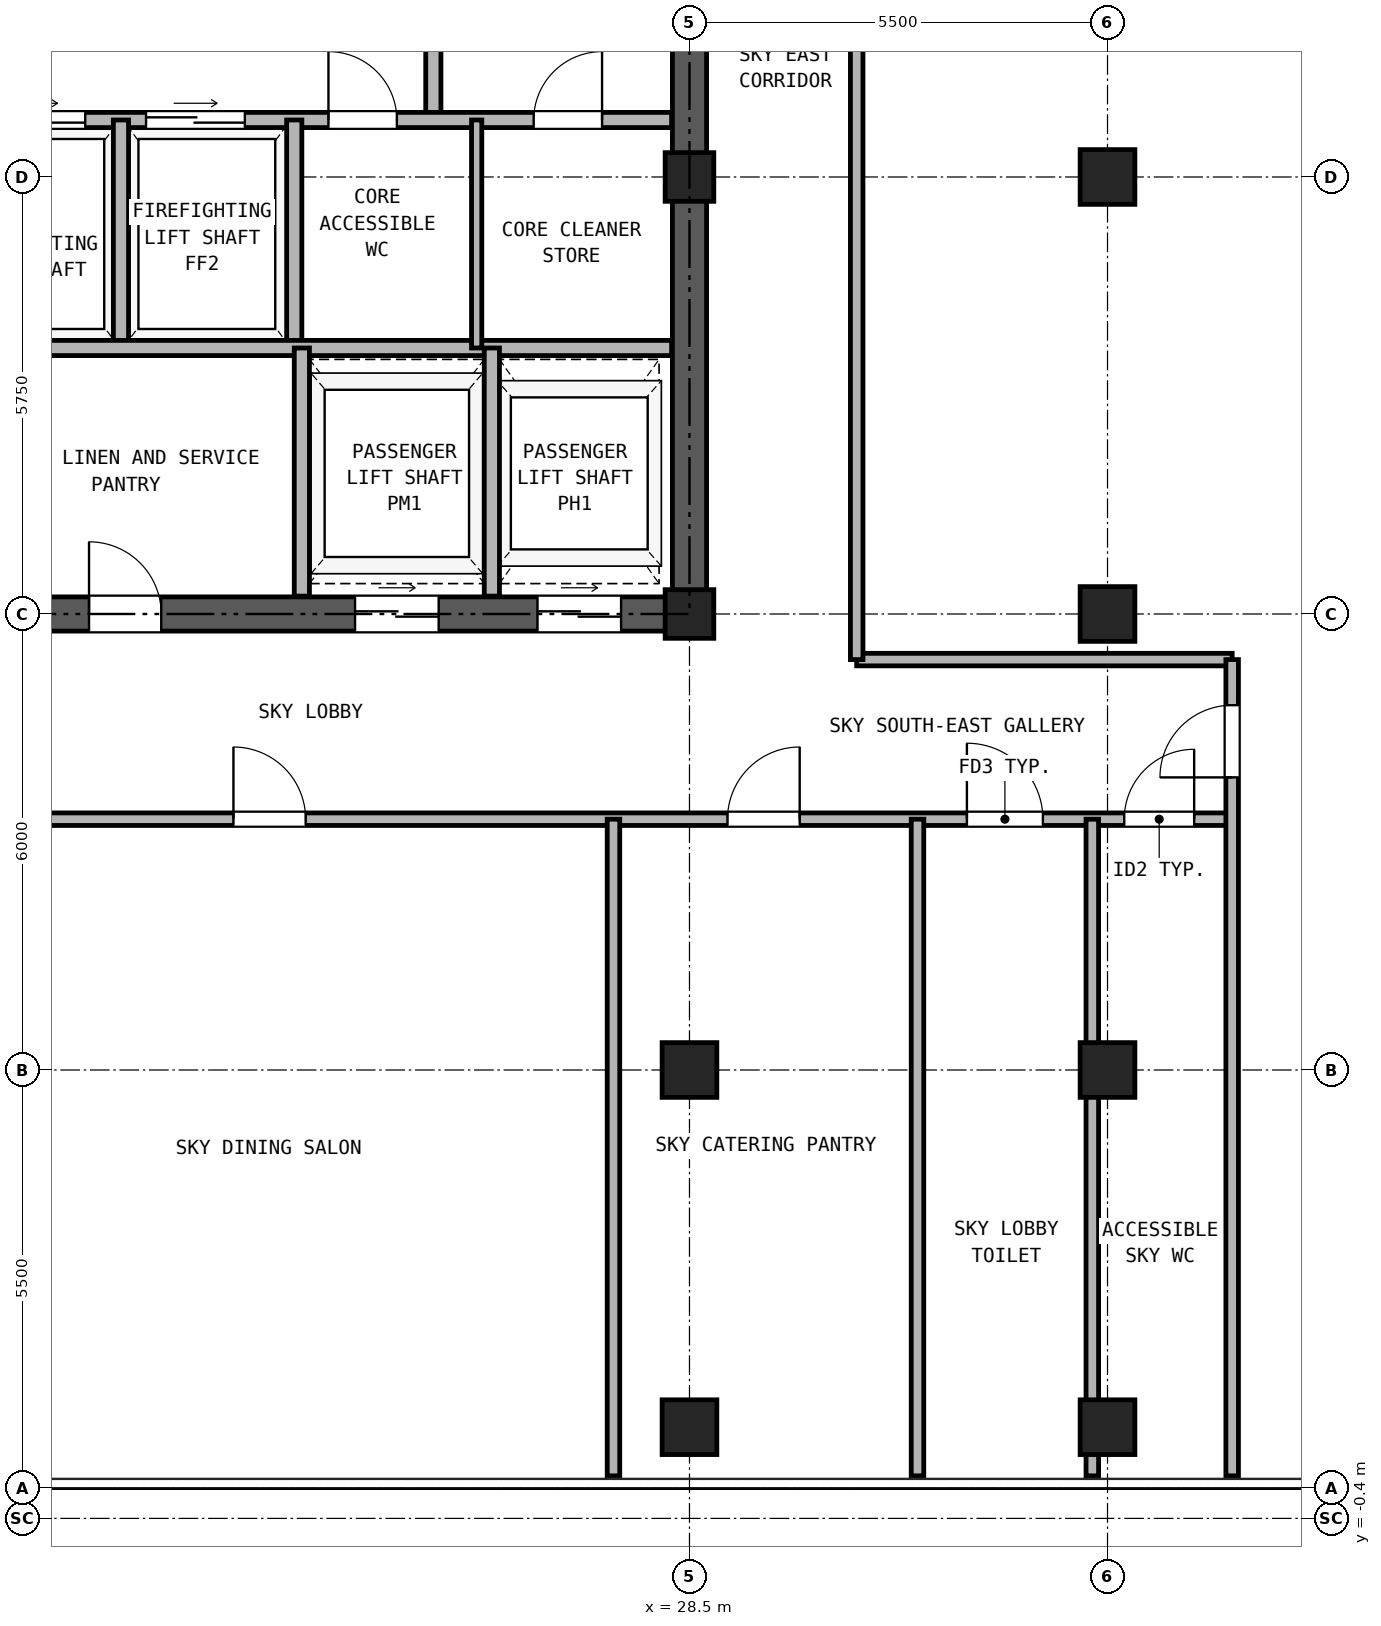
"""IFC4 building model, lengths in metres.
Left out: names, types, materials, properties, quantities, classifications, styles, units other than length and angle.
Written with IfcOpenShell. Run it as: python <this file> out.ifc"""

import sys

from ifc_helpers import new_model, si_unit, direction, frame, frame_2d, origin, origin_2d, place, context, subcontext, project, spatial, rectangle, hollow_rectangle, extrude, source, transform, mapped, element, fill, save


model = new_model("IFC4")
c1 = context("Model", 3, precision=1e-05, world=origin(), true_north=direction((0.0, 1.0)))
c2 = subcontext(c1, "Body", "Model", "MODEL_VIEW")
j1 = project(units=[si_unit("LENGTHUNIT", "METRE"), si_unit("PLANEANGLEUNIT", "RADIAN")], contexts=[c1])
p1 = place(None, origin())
s1 = spatial("IfcSite", under=j1, at=p1, CompositionType="ELEMENT")
p2 = place(p1, origin())
s2 = spatial("IfcBuilding", under=s1, at=p2, CompositionType="ELEMENT")
p3 = place(p2, frame((0.0, 0.0, 151.6)))
s3 = spatial("IfcBuildingStorey", under=s2, at=p3, CompositionType="ELEMENT", Elevation=151.6)
m1 = source(origin(), c2, "Body", "SweptSolid", [
    extrude(hollow_rectangle(XDim=0.72, YDim=0.72, WallThickness=0.04, at=origin_2d()), origin(), (0.0, 0.0, 1.0), 4.25),
])
for number, where, z_axis, x_axis in (
    (1, (28.5, 0.8, 0.0), (0.0, 0.0, 1.0), (1.0, 0.0, 0.0)),
    (2, (34.0, 0.8, 0.0), (0.0, 0.0, 1.0), (1.0, 0.0, 0.0)),
    (3, (28.5, 5.5, 0.0), (0.0, 0.0, 1.0), (1.0, 0.0, 0.0)),
):
    element("IfcColumn", number, at=place(p3, frame(where, z_axis=z_axis, x_axis=x_axis)), inside=s3, PredefinedType="COLUMN", context=c2, shape_type="MappedRepresentation", body=[
        mapped(m1, transform((0.0, 0.0, 0.0), x_axis=(1.0, 0.0, 0.0), y_axis=(0.0, 1.0, 0.0), z_axis=(0.0, 0.0, 1.0), scale=1.0)),
    ])
m2 = source(origin(), c2, "Body", "SweptSolid", [
    extrude(hollow_rectangle(XDim=0.64, YDim=0.64, WallThickness=0.035, at=origin_2d()), origin(), (0.0, 0.0, 1.0), 4.25),
])
for number, where, z_axis, x_axis in (
    (4, (28.5, 11.5, 0.0), (0.0, 0.0, 1.0), (1.0, 0.0, 0.0)),
    (5, (28.5, 17.25, 0.0), (0.0, 0.0, 1.0), (1.0, 0.0, 0.0)),
):
    element("IfcColumn", number, at=place(p3, frame(where, z_axis=z_axis, x_axis=x_axis)), inside=s3, PredefinedType="COLUMN", context=c2, shape_type="MappedRepresentation", body=[
        mapped(m2, transform((0.0, 0.0, 0.0), x_axis=(1.0, 0.0, 0.0), y_axis=(0.0, 1.0, 0.0), z_axis=(0.0, 0.0, 1.0), scale=1.0)),
    ])
for number, where, z_axis, x_axis in (
    (6, (34.0, 5.5, 0.0), (0.0, 0.0, 1.0), (1.0, 0.0, 0.0)),
    (7, (34.0, 11.5, 0.0), (0.0, 0.0, 1.0), (1.0, 0.0, 0.0)),
    (8, (34.0, 17.25, 0.0), (0.0, 0.0, 1.0), (1.0, 0.0, 0.0)),
):
    element("IfcColumn", number, at=place(p3, frame(where, z_axis=z_axis, x_axis=x_axis)), inside=s3, PredefinedType="COLUMN", context=c2, shape_type="MappedRepresentation", body=[
        mapped(m1, transform((0.0, 0.0, 0.0), x_axis=(1.0, 0.0, 0.0), y_axis=(0.0, 1.0, 0.0), z_axis=(0.0, 0.0, 1.0), scale=1.0)),
    ])
p4 = place(p3, frame((18.275, 11.5, 0.0), z_axis=(0.0, 0.0, 1.0), x_axis=(1.0, 0.0, 0.0)))
e9 = element("IfcWall", 9, at=p4, inside=s3, PredefinedType="SHEAR", context=c2, shape_type="SweptSolid", body=[
    extrude(rectangle(XDim=10.45, YDim=0.45, at=frame_2d((5.225, 0.0))), origin(), (0.0, 0.0, 1.0), 4.25),
])
p5 = place(p4, frame((2.325, 0.0, 0.0)))
e10 = element("IfcOpeningElement", 10, at=p5, cuts=e9, PredefinedType="OPENING", context=c2, shape_type="SweptSolid", body=[
    extrude(rectangle(XDim=0.95, YDim=2.15, at=frame_2d((0.475, 1.075))), frame((0.0, 0.235, 0.0), z_axis=(0.0, -1.0, 0.0), x_axis=(1.0, 0.0, 0.0)), (0.0, 0.0, 1.0), 0.47),
])
p6 = place(p4, frame((5.825, 0.0, 0.0)))
e11 = element("IfcOpeningElement", 11, at=p6, cuts=e9, PredefinedType="OPENING", context=c2, shape_type="SweptSolid", body=[
    extrude(rectangle(XDim=1.1, YDim=2.25, at=frame_2d((0.55, 1.125))), frame((0.0, 0.235, 0.0), z_axis=(0.0, -1.0, 0.0), x_axis=(1.0, 0.0, 0.0)), (0.0, 0.0, 1.0), 0.47),
])
p7 = place(p4, frame((8.225, 0.0, 0.0)))
e12 = element("IfcOpeningElement", 12, at=p7, cuts=e9, PredefinedType="OPENING", context=c2, shape_type="SweptSolid", body=[
    extrude(rectangle(XDim=1.1, YDim=2.25, at=frame_2d((0.55, 1.125))), frame((0.0, 0.235, 0.0), z_axis=(0.0, -1.0, 0.0), x_axis=(1.0, 0.0, 0.0)), (0.0, 0.0, 1.0), 0.47),
])
p8 = place(p3, frame((28.5, 11.725, 0.0), z_axis=(0.0, 0.0, 1.0), x_axis=(0.0, 1.0, 0.0)))
e13 = element("IfcWall", 13, at=p8, inside=s3, PredefinedType="SHEAR", context=c2, shape_type="SweptSolid", body=[
    extrude(rectangle(XDim=16.8, YDim=0.45, at=frame_2d((8.4, 0.0))), origin(), (0.0, 0.0, 1.0), 4.25),
])
p9 = place(p8, frame((7.425, 0.0, 0.0)))
e14 = element("IfcOpeningElement", 14, at=p9, cuts=e13, PredefinedType="OPENING", context=c2, shape_type="SweptSolid", body=[
    extrude(rectangle(XDim=1.15, YDim=2.2, at=frame_2d((0.575, 1.1))), frame((0.0, 0.235, 0.0), z_axis=(0.0, -1.0, 0.0), x_axis=(1.0, 0.0, 0.0)), (0.0, 0.0, 1.0), 0.47),
])
p10 = place(p3, frame((25.13, 18.0, 0.0), z_axis=(0.0, 0.0, 1.0), x_axis=(0.0, 1.0, 0.0)))
e15 = element("IfcWall", 15, at=p10, inside=s3, PredefinedType="PARTITIONING", context=c2, shape_type="SweptSolid", body=[
    extrude(rectangle(XDim=3.39, YDim=0.2, at=frame_2d((1.695, 0.0))), origin(), (0.0, 0.0, 1.0), 4.25),
])
p11 = place(p10, frame((1.1, 0.0, 0.0)))
e16 = element("IfcOpeningElement", 16, at=p11, cuts=e15, PredefinedType="OPENING", context=c2, shape_type="SweptSolid", body=[
    extrude(rectangle(XDim=1.15, YDim=2.2, at=frame_2d((0.575, 1.1))), frame((0.0, 0.11, 0.0), z_axis=(0.0, -1.0, 0.0), x_axis=(1.0, 0.0, 0.0)), (0.0, 0.0, 1.0), 0.22),
])
p12 = place(p3, frame((18.735, 18.0, 0.0), z_axis=(0.0, 0.0, 1.0), x_axis=(1.0, 0.0, 0.0)))
e17 = element("IfcWall", 17, at=p12, inside=s3, PredefinedType="PARTITIONING", context=c2, shape_type="SweptSolid", body=[
    extrude(rectangle(XDim=9.53, YDim=0.2, at=frame_2d((4.765, 0.0))), origin(), (0.0, 0.0, 1.0), 4.25),
])
p13 = place(p12, frame((0.515, 0.0, 0.0)))
e18 = element("IfcOpeningElement", 18, at=p13, cuts=e17, PredefinedType="OPENING", context=c2, shape_type="SweptSolid", body=[
    extrude(rectangle(XDim=1.3, YDim=2.3, at=frame_2d((0.65, 1.15))), frame((0.0, 0.11, 0.0), z_axis=(0.0, -1.0, 0.0), x_axis=(1.0, 0.0, 0.0)), (0.0, 0.0, 1.0), 0.22),
])
p14 = place(p12, frame((2.615, 0.0, 0.0)))
e19 = element("IfcOpeningElement", 19, at=p14, cuts=e17, PredefinedType="OPENING", context=c2, shape_type="SweptSolid", body=[
    extrude(rectangle(XDim=1.3, YDim=2.3, at=frame_2d((0.65, 1.15))), frame((0.0, 0.11, 0.0), z_axis=(0.0, -1.0, 0.0), x_axis=(1.0, 0.0, 0.0)), (0.0, 0.0, 1.0), 0.22),
])
p15 = place(p12, frame((5.015, 0.0, 0.0)))
e20 = element("IfcOpeningElement", 20, at=p15, cuts=e17, PredefinedType="OPENING", context=c2, shape_type="SweptSolid", body=[
    extrude(rectangle(XDim=0.9, YDim=2.05, at=frame_2d((0.45, 1.025))), frame((0.0, 0.11, 0.0), z_axis=(0.0, -1.0, 0.0), x_axis=(1.0, 0.0, 0.0)), (0.0, 0.0, 1.0), 0.22),
])
p16 = place(p12, frame((7.715, 0.0, 0.0)))
e21 = element("IfcOpeningElement", 21, at=p16, cuts=e17, PredefinedType="OPENING", context=c2, shape_type="SweptSolid", body=[
    extrude(rectangle(XDim=0.9, YDim=2.05, at=frame_2d((0.45, 1.025))), frame((0.0, 0.11, 0.0), z_axis=(0.0, -1.0, 0.0), x_axis=(1.0, 0.0, 0.0)), (0.0, 0.0, 1.0), 0.22),
])
for number, where, z_axis, x_axis in (
    (22, (21.02, 15.0, 0.0), (0.0, 0.0, 1.0), (0.0, 1.0, 0.0)),
    (23, (23.3, 15.0, 0.0), (0.0, 0.0, 1.0), (0.0, 1.0, 0.0)),
):
    element("IfcWall", number, at=place(p3, frame(where, z_axis=z_axis, x_axis=x_axis)), inside=s3, PredefinedType="PARTITIONING", context=c2, shape_type="SweptSolid", body=[
        extrude(rectangle(XDim=3.0, YDim=0.2, at=frame_2d((1.5, 0.0))), origin(), (0.0, 0.0, 1.0), 4.25),
    ])
p17 = place(p3, frame((18.735, 15.0, 0.0), z_axis=(0.0, 0.0, 1.0), x_axis=(1.0, 0.0, 0.0)))
e24 = element("IfcWall", 24, at=p17, inside=s3, PredefinedType="PARTITIONING", context=c2, shape_type="SweptSolid", body=[
    extrude(rectangle(XDim=9.53, YDim=0.2, at=frame_2d((4.765, 0.0))), origin(), (0.0, 0.0, 1.0), 4.25),
])
p18 = place(p3, frame((25.7, 15.0, 0.0), z_axis=(0.0, 0.0, 1.0), x_axis=(0.0, 1.0, 0.0)))
e25 = element("IfcWall", 25, at=p18, inside=s3, PredefinedType="PARTITIONING", context=c2, shape_type="SweptSolid", body=[
    extrude(rectangle(XDim=3.0, YDim=0.135, at=frame_2d((1.5, 0.0))), origin(), (0.0, 0.0, 1.0), 4.25),
])
for number, where, z_axis, x_axis in (
    (26, (23.4, 11.735, 0.0), (0.0, 0.0, 1.0), (0.0, 1.0, 0.0)),
    (27, (25.9, 11.735, 0.0), (0.0, 0.0, 1.0), (0.0, 1.0, 0.0)),
):
    element("IfcWall", number, at=place(p3, frame(where, z_axis=z_axis, x_axis=x_axis)), inside=s3, PredefinedType="PARTITIONING", context=c2, shape_type="SweptSolid", body=[
        extrude(rectangle(XDim=3.265, YDim=0.2, at=frame_2d((1.632, 0.0))), origin(), (0.0, 0.0, 1.0), 4.25),
    ])
p19 = place(p3, frame((8.0, 8.8, 0.0), z_axis=(0.0, 0.0, 1.0), x_axis=(1.0, 0.0, 0.0)))
e28 = element("IfcWall", 28, at=p19, inside=s3, PredefinedType="PARTITIONING", context=c2, shape_type="SweptSolid", body=[
    extrude(rectangle(XDim=27.64, YDim=0.165, at=frame_2d((13.82, 0.0))), origin(), (0.0, 0.0, 1.0), 4.25),
])
p20 = place(p19, frame((4.75, 0.0, 0.0)))
e29 = element("IfcOpeningElement", 29, at=p20, cuts=e28, PredefinedType="OPENING", context=c2, shape_type="SweptSolid", body=[
    extrude(rectangle(XDim=0.95, YDim=2.15, at=frame_2d((0.475, 1.075))), frame((0.0, 0.093, 0.0), z_axis=(0.0, -1.0, 0.0), x_axis=(1.0, 0.0, 0.0)), (0.0, 0.0, 1.0), 0.185),
])
p21 = place(p19, frame((14.5, 0.0, 0.0)))
e30 = element("IfcOpeningElement", 30, at=p21, cuts=e28, PredefinedType="OPENING", context=c2, shape_type="SweptSolid", body=[
    extrude(rectangle(XDim=0.95, YDim=2.15, at=frame_2d((0.475, 1.075))), frame((0.0, 0.093, 0.0), z_axis=(0.0, -1.0, 0.0), x_axis=(1.0, 0.0, 0.0)), (0.0, 0.0, 1.0), 0.185),
])
p22 = place(p19, frame((21.0, 0.0, 0.0)))
e31 = element("IfcOpeningElement", 31, at=p22, cuts=e28, PredefinedType="OPENING", context=c2, shape_type="SweptSolid", body=[
    extrude(rectangle(XDim=0.95, YDim=2.15, at=frame_2d((0.475, 1.075))), frame((0.0, 0.093, 0.0), z_axis=(0.0, -1.0, 0.0), x_axis=(1.0, 0.0, 0.0)), (0.0, 0.0, 1.0), 0.185),
])
p23 = place(p19, frame((24.15, 0.0, 0.0)))
e32 = element("IfcOpeningElement", 32, at=p23, cuts=e28, PredefinedType="OPENING", context=c2, shape_type="SweptSolid", body=[
    extrude(rectangle(XDim=1.0, YDim=2.15, at=frame_2d((0.5, 1.075))), frame((0.0, 0.093, 0.0), z_axis=(0.0, -1.0, 0.0), x_axis=(1.0, 0.0, 0.0)), (0.0, 0.0, 1.0), 0.185),
])
p24 = place(p19, frame((26.22, 0.0, 0.0)))
e33 = element("IfcOpeningElement", 33, at=p24, cuts=e28, PredefinedType="OPENING", context=c2, shape_type="SweptSolid", body=[
    extrude(rectangle(XDim=0.92, YDim=2.1, at=frame_2d((0.46, 1.05))), frame((0.0, 0.093, 0.0), z_axis=(0.0, -1.0, 0.0), x_axis=(1.0, 0.0, 0.0)), (0.0, 0.0, 1.0), 0.185),
])
p25 = place(p3, frame((30.7, 10.9, 0.0), z_axis=(0.0, 0.0, 1.0), x_axis=(1.0, 0.0, 0.0)))
e34 = element("IfcWall", 34, at=p25, inside=s3, PredefinedType="PARTITIONING", context=c2, shape_type="SweptSolid", body=[
    extrude(rectangle(XDim=4.94, YDim=0.165, at=frame_2d((2.47, 0.0))), origin(), (0.0, 0.0, 1.0), 4.25),
])
p26 = place(p3, frame((30.7, 10.9, 0.0), z_axis=(0.0, 0.0, 1.0), x_axis=(0.0, 1.0, 0.0)))
e35 = element("IfcWall", 35, at=p26, inside=s3, PredefinedType="PARTITIONING", context=c2, shape_type="SweptSolid", body=[
    extrude(rectangle(XDim=18.35, YDim=0.165, at=frame_2d((9.175, 0.0))), origin(), (0.0, 0.0, 1.0), 4.25),
])
p27 = place(p26, frame((8.675, 0.0, 0.0)))
e36 = element("IfcOpeningElement", 36, at=p27, cuts=e35, PredefinedType="OPENING", context=c2, shape_type="SweptSolid", body=[
    extrude(rectangle(XDim=0.95, YDim=2.15, at=frame_2d((0.475, 1.075))), frame((0.0, 0.093, 0.0), z_axis=(0.0, -1.0, 0.0), x_axis=(1.0, 0.0, 0.0)), (0.0, 0.0, 1.0), 0.185),
])
p28 = place(p3, frame((35.64, 0.16, 0.0), z_axis=(0.0, 0.0, 1.0), x_axis=(0.0, 1.0, 0.0)))
e37 = element("IfcWall", 37, at=p28, inside=s3, PredefinedType="PARTITIONING", context=c2, shape_type="SweptSolid", body=[
    extrude(rectangle(XDim=10.74, YDim=0.165, at=frame_2d((5.37, 0.0))), origin(), (0.0, 0.0, 1.0), 4.25),
])
p29 = place(p28, frame((9.19, 0.0, 0.0)))
e38 = element("IfcOpeningElement", 38, at=p29, cuts=e37, PredefinedType="OPENING", context=c2, shape_type="SweptSolid", body=[
    extrude(rectangle(XDim=0.95, YDim=2.15, at=frame_2d((0.475, 1.075))), frame((0.0, 0.093, 0.0), z_axis=(0.0, -1.0, 0.0), x_axis=(1.0, 0.0, 0.0)), (0.0, 0.0, 1.0), 0.185),
])
for number, where, z_axis, x_axis in (
    (39, (27.5, 0.16, 0.0), (0.0, 0.0, 1.0), (0.0, 1.0, 0.0)),
    (40, (31.5, 0.16, 0.0), (0.0, 0.0, 1.0), (0.0, 1.0, 0.0)),
):
    element("IfcWall", number, at=place(p3, frame(where, z_axis=z_axis, x_axis=x_axis)), inside=s3, PredefinedType="PARTITIONING", context=c2, shape_type="SweptSolid", body=[
        extrude(rectangle(XDim=8.64, YDim=0.165, at=frame_2d((4.32, 0.0))), origin(), (0.0, 0.0, 1.0), 4.25),
    ])
p30 = place(p3, frame((33.8, 0.16, 0.0), z_axis=(0.0, 0.0, 1.0), x_axis=(0.0, 1.0, 0.0)))
e41 = element("IfcWall", 41, at=p30, inside=s3, PredefinedType="PARTITIONING", context=c2, shape_type="SweptSolid", body=[
    extrude(rectangle(XDim=8.64, YDim=0.165, at=frame_2d((4.32, 0.0))), origin(), (0.0, 0.0, 1.0), 3.623),
])
p31 = place(p13, origin())
e42 = element("IfcDoor", 42, at=p31, inside=s3, OperationType="DOUBLE_DOOR_SLIDING", PredefinedType="DOOR", context=c2, shape_type="SweptSolid", body=[
    extrude(rectangle(XDim=1.3, YDim=2.3, at=frame_2d((0.65, 1.15))), frame((0.0, 0.025, 0.0), z_axis=(0.0, -1.0, 0.0), x_axis=(1.0, 0.0, 0.0)), (0.0, 0.0, 1.0), 0.05),
])
fill(e18, e42)
p32 = place(p14, origin())
e43 = element("IfcDoor", 43, at=p32, inside=s3, OperationType="DOUBLE_DOOR_SLIDING", PredefinedType="DOOR", context=c2, shape_type="SweptSolid", body=[
    extrude(rectangle(XDim=1.3, YDim=2.3, at=frame_2d((0.65, 1.15))), frame((0.0, 0.025, 0.0), z_axis=(0.0, -1.0, 0.0), x_axis=(1.0, 0.0, 0.0)), (0.0, 0.0, 1.0), 0.05),
])
fill(e19, e43)
p33 = place(p15, frame((0.9, 0.0, 0.0), z_axis=(0.0, 0.0, 1.0), x_axis=(-1.0, 0.0, 0.0)))
e44 = element("IfcDoor", 44, at=p33, inside=s3, OperationType="SINGLE_SWING_LEFT", PredefinedType="DOOR", context=c2, shape_type="SweptSolid", body=[
    extrude(rectangle(XDim=0.9, YDim=2.05, at=frame_2d((0.45, 1.025))), frame((0.0, 0.025, 0.0), z_axis=(0.0, -1.0, 0.0), x_axis=(1.0, 0.0, 0.0)), (0.0, 0.0, 1.0), 0.05),
])
fill(e20, e44)
p34 = place(p16, frame((0.9, 0.0, 0.0), z_axis=(0.0, 0.0, 1.0), x_axis=(-1.0, 0.0, 0.0)))
e45 = element("IfcDoor", 45, at=p34, inside=s3, OperationType="SINGLE_SWING_RIGHT", PredefinedType="DOOR", context=c2, shape_type="SweptSolid", body=[
    extrude(rectangle(XDim=0.9, YDim=2.05, at=frame_2d((0.45, 1.025))), frame((0.0, 0.025, 0.0), z_axis=(0.0, -1.0, 0.0), x_axis=(1.0, 0.0, 0.0)), (0.0, 0.0, 1.0), 0.05),
])
fill(e21, e45)
p35 = place(p5, frame((0.95, 0.0, 0.0), z_axis=(0.0, 0.0, 1.0), x_axis=(-1.0, 0.0, 0.0)))
e46 = element("IfcDoor", 46, at=p35, inside=s3, OperationType="SINGLE_SWING_LEFT", PredefinedType="DOOR", context=c2, shape_type="SweptSolid", body=[
    extrude(rectangle(XDim=0.95, YDim=2.15, at=frame_2d((0.475, 1.075))), frame((0.0, 0.025, 0.0), z_axis=(0.0, -1.0, 0.0), x_axis=(1.0, 0.0, 0.0)), (0.0, 0.0, 1.0), 0.05),
])
fill(e10, e46)
p36 = place(p6, frame((1.1, 0.0, 0.0), z_axis=(0.0, 0.0, 1.0), x_axis=(-1.0, 0.0, 0.0)))
e47 = element("IfcDoor", 47, at=p36, inside=s3, OperationType="DOUBLE_DOOR_SLIDING", PredefinedType="DOOR", context=c2, shape_type="SweptSolid", body=[
    extrude(rectangle(XDim=1.1, YDim=2.25, at=frame_2d((0.55, 1.125))), frame((0.0, 0.025, 0.0), z_axis=(0.0, -1.0, 0.0), x_axis=(1.0, 0.0, 0.0)), (0.0, 0.0, 1.0), 0.05),
])
fill(e11, e47)
p37 = place(p7, frame((1.1, 0.0, 0.0), z_axis=(0.0, 0.0, 1.0), x_axis=(-1.0, 0.0, 0.0)))
e48 = element("IfcDoor", 48, at=p37, inside=s3, OperationType="DOUBLE_DOOR_SLIDING", PredefinedType="DOOR", context=c2, shape_type="SweptSolid", body=[
    extrude(rectangle(XDim=1.1, YDim=2.25, at=frame_2d((0.55, 1.125))), frame((0.0, 0.025, 0.0), z_axis=(0.0, -1.0, 0.0), x_axis=(1.0, 0.0, 0.0)), (0.0, 0.0, 1.0), 0.05),
])
fill(e12, e48)
p38 = place(p21, frame((0.95, 0.0, 0.0), z_axis=(0.0, 0.0, 1.0), x_axis=(-1.0, 0.0, 0.0)))
e49 = element("IfcDoor", 49, at=p38, inside=s3, OperationType="SINGLE_SWING_LEFT", PredefinedType="DOOR", context=c2, shape_type="SweptSolid", body=[
    extrude(rectangle(XDim=0.95, YDim=2.15, at=frame_2d((0.475, 1.075))), frame((0.0, 0.025, 0.0), z_axis=(0.0, -1.0, 0.0), x_axis=(1.0, 0.0, 0.0)), (0.0, 0.0, 1.0), 0.05),
])
fill(e30, e49)
p39 = place(p22, frame((0.95, 0.0, 0.0), z_axis=(0.0, 0.0, 1.0), x_axis=(-1.0, 0.0, 0.0)))
e50 = element("IfcDoor", 50, at=p39, inside=s3, OperationType="SINGLE_SWING_RIGHT", PredefinedType="DOOR", context=c2, shape_type="SweptSolid", body=[
    extrude(rectangle(XDim=0.95, YDim=2.15, at=frame_2d((0.475, 1.075))), frame((0.0, 0.025, 0.0), z_axis=(0.0, -1.0, 0.0), x_axis=(1.0, 0.0, 0.0)), (0.0, 0.0, 1.0), 0.05),
])
fill(e31, e50)
p40 = place(p23, frame((1.0, 0.0, 0.0), z_axis=(0.0, 0.0, 1.0), x_axis=(-1.0, 0.0, 0.0)))
e51 = element("IfcDoor", 51, at=p40, inside=s3, OperationType="SINGLE_SWING_LEFT", PredefinedType="DOOR", context=c2, shape_type="SweptSolid", body=[
    extrude(rectangle(XDim=1.0, YDim=2.15, at=frame_2d((0.5, 1.075))), frame((0.0, 0.025, 0.0), z_axis=(0.0, -1.0, 0.0), x_axis=(1.0, 0.0, 0.0)), (0.0, 0.0, 1.0), 0.05),
])
fill(e32, e51)
p41 = place(p24, frame((0.92, 0.0, 0.0), z_axis=(0.0, 0.0, 1.0), x_axis=(-1.0, 0.0, 0.0)))
e52 = element("IfcDoor", 52, at=p41, inside=s3, OperationType="SINGLE_SWING_RIGHT", PredefinedType="DOOR", context=c2, shape_type="SweptSolid", body=[
    extrude(rectangle(XDim=0.92, YDim=2.1, at=frame_2d((0.46, 1.05))), frame((0.0, 0.025, 0.0), z_axis=(0.0, -1.0, 0.0), x_axis=(1.0, 0.0, 0.0)), (0.0, 0.0, 1.0), 0.05),
])
fill(e33, e52)
p42 = place(p29, origin())
e53 = element("IfcDoor", 53, at=p42, inside=s3, OperationType="SINGLE_SWING_LEFT", PredefinedType="DOOR", context=c2, shape_type="SweptSolid", body=[
    extrude(rectangle(XDim=0.95, YDim=2.15, at=frame_2d((0.475, 1.075))), frame((0.0, 0.025, 0.0), z_axis=(0.0, -1.0, 0.0), x_axis=(1.0, 0.0, 0.0)), (0.0, 0.0, 1.0), 0.05),
])
fill(e38, e53)
save(model, sys.argv[1])
